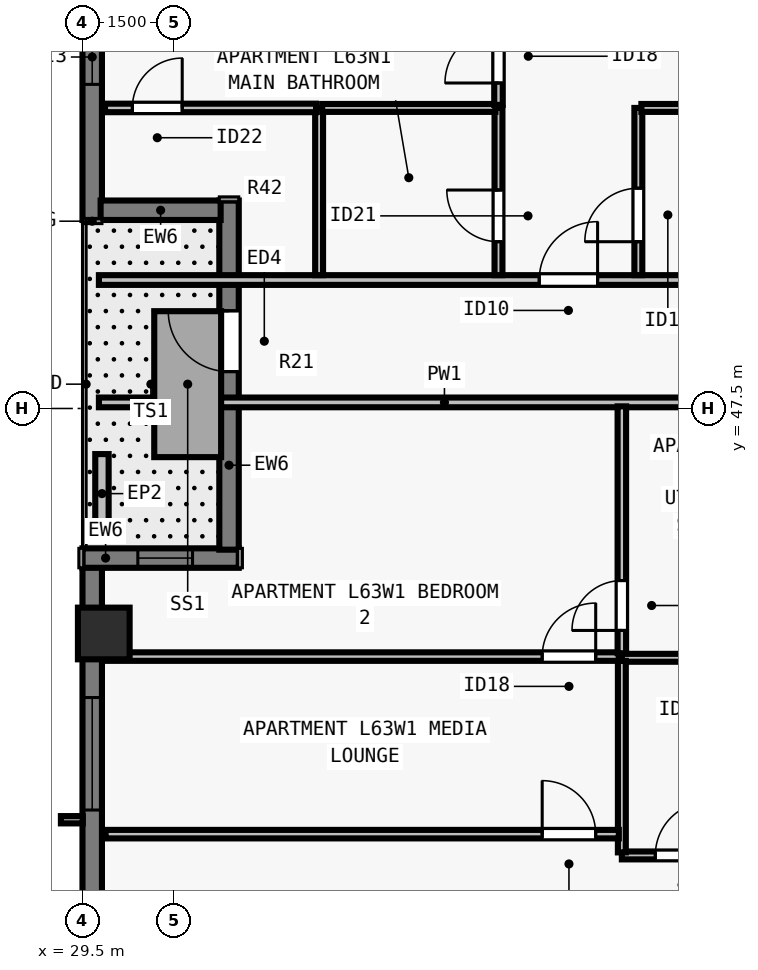
"""IFC4 building model, lengths in metres.
Left out: names, types, materials, properties, quantities, classifications, styles, units other than length and angle.
Written with IfcOpenShell. Run it as: python <this file> out.ifc"""

import sys

from ifc_helpers import new_model, si_unit, direction, frame, frame_2d, origin, origin_2d, place, context, subcontext, project, spatial, rectangle, extrude, element, fill, save


model = new_model("IFC4")
c1 = context("Model", 3, precision=1e-05, world=origin(), true_north=direction((0.0, 1.0)))
c2 = subcontext(c1, "Body", "Model", "MODEL_VIEW")
j1 = project(units=[si_unit("LENGTHUNIT", "METRE"), si_unit("PLANEANGLEUNIT", "RADIAN")], contexts=[c1])
p1 = place(None, origin())
s1 = spatial("IfcSite", under=j1, at=p1, CompositionType="ELEMENT")
p2 = place(p1, origin())
s2 = spatial("IfcBuilding", under=s1, at=p2, CompositionType="ELEMENT")
p3 = place(p2, frame((0.0, 0.0, 230.5)))
s3 = spatial("IfcBuildingStorey", under=s2, at=p3, CompositionType="ELEMENT", Elevation=230.5)
p4 = place(p3, frame((29.85, 43.8, 0.0), z_axis=(0.0, 0.0, 1.0), x_axis=(0.0, 1.0, 0.0)))
e1 = element("IfcColumn", 1, at=p4, inside=s3, PredefinedType="COLUMN", context=c2, shape_type="SweptSolid", body=[
    extrude(rectangle(XDim=0.85, YDim=0.85, at=origin_2d()), origin(), (0.0, 0.0, 1.0), 3.5),
])
p5 = place(p3, frame((29.66, 50.6, 0.0), z_axis=(0.0, 0.0, 1.0), x_axis=(0.0, 1.0, 0.0)))
e2 = element("IfcWall", 2, at=p5, inside=s3, PredefinedType="SOLIDWALL", context=c2, shape_type="SweptSolid", body=[
    extrude(rectangle(XDim=5.602, YDim=0.32, at=frame_2d((2.801, 0.0))), origin(), (0.0, 0.0, 1.0), 3.29),
])
p6 = place(p5, frame((2.23, 0.0, 0.8)))
e3 = element("IfcOpeningElement", 3, at=p6, cuts=e2, PredefinedType="OPENING", context=c2, shape_type="SweptSolid", body=[
    extrude(rectangle(XDim=0.9, YDim=1.678, at=frame_2d((0.45, 0.839))), frame((0.0, 0.17, 0.0), z_axis=(0.0, -1.0, 0.0), x_axis=(1.0, 0.0, 0.0)), (0.0, 0.0, 1.0), 0.34),
])
p7 = place(p3, frame((29.66, 21.5, 0.0), z_axis=(0.0, 0.0, 1.0), x_axis=(0.0, 1.0, 0.0)))
e4 = element("IfcWall", 4, at=p7, inside=s3, PredefinedType="SOLIDWALL", context=c2, shape_type="SweptSolid", body=[
    extrude(rectangle(XDim=23.402, YDim=0.32, at=frame_2d((11.701, 0.0))), origin(), (0.0, 0.0, 1.0), 3.29),
])
p8 = place(p7, frame((9.416, 0.0, 0.8)))
e5 = element("IfcOpeningElement", 5, at=p8, cuts=e4, PredefinedType="OPENING", context=c2, shape_type="SweptSolid", body=[
    extrude(rectangle(XDim=1.55, YDim=1.678, at=frame_2d((0.775, 0.839))), frame((0.0, 0.17, 0.0), z_axis=(0.0, -1.0, 0.0), x_axis=(1.0, 0.0, 0.0)), (0.0, 0.0, 1.0), 0.34),
])
p9 = place(p7, frame((15.886, 0.0, 0.8)))
e6 = element("IfcOpeningElement", 6, at=p9, cuts=e4, PredefinedType="OPENING", context=c2, shape_type="SweptSolid", body=[
    extrude(rectangle(XDim=1.55, YDim=1.678, at=frame_2d((0.775, 0.839))), frame((0.0, 0.17, 0.0), z_axis=(0.0, -1.0, 0.0), x_axis=(1.0, 0.0, 0.0)), (0.0, 0.0, 1.0), 0.34),
])
p10 = place(p7, frame((19.397, 0.0, 0.8)))
e7 = element("IfcOpeningElement", 7, at=p10, cuts=e4, PredefinedType="OPENING", context=c2, shape_type="SweptSolid", body=[
    extrude(rectangle(XDim=1.85, YDim=1.678, at=frame_2d((0.925, 0.839))), frame((0.0, 0.17, 0.0), z_axis=(0.0, -1.0, 0.0), x_axis=(1.0, 0.0, 0.0)), (0.0, 0.0, 1.0), 0.34),
])
p11 = place(p3, frame((29.5, 45.04, 0.0), z_axis=(0.0, 0.0, 1.0), x_axis=(1.0, 0.0, 0.0)))
e8 = element("IfcWall", 8, at=p11, inside=s3, PredefinedType="SOLIDWALL", context=c2, shape_type="SweptSolid", body=[
    extrude(rectangle(XDim=2.57, YDim=0.32, at=frame_2d((1.285, 0.0))), origin(), (0.0, 0.0, 1.0), 3.29),
])
p12 = place(p11, frame((0.91, 0.0, 0.8)))
e9 = element("IfcOpeningElement", 9, at=p12, cuts=e8, PredefinedType="OPENING", context=c2, shape_type="SweptSolid", body=[
    extrude(rectangle(XDim=0.9, YDim=1.678, at=frame_2d((0.45, 0.839))), frame((0.0, 0.17, 0.0), z_axis=(0.0, -1.0, 0.0), x_axis=(1.0, 0.0, 0.0)), (0.0, 0.0, 1.0), 0.34),
])
p13 = place(p3, frame((31.91, 45.178, 0.0), z_axis=(0.0, 0.0, 1.0), x_axis=(0.0, 1.0, 0.0)))
e10 = element("IfcWall", 10, at=p13, inside=s3, PredefinedType="SOLIDWALL", context=c2, shape_type="SweptSolid", body=[
    extrude(rectangle(XDim=5.742, YDim=0.32, at=frame_2d((2.871, 0.0))), origin(), (0.0, 0.0, 1.0), 3.29),
])
p14 = place(p13, frame((2.928, 0.0, 0.0)))
e11 = element("IfcOpeningElement", 11, at=p14, cuts=e10, PredefinedType="OPENING", context=c2, shape_type="SweptSolid", body=[
    extrude(rectangle(XDim=1.0, YDim=2.15, at=frame_2d((0.5, 1.075))), frame((0.0, 0.17, 0.0), z_axis=(0.0, -1.0, 0.0), x_axis=(1.0, 0.0, 0.0)), (0.0, 0.0, 1.0), 0.34),
])
p15 = place(p3, frame((31.772, 50.76, 0.0), z_axis=(0.0, 0.0, 1.0), x_axis=(-1.0, 0.0, 0.0)))
e12 = element("IfcWall", 12, at=p15, inside=s3, PredefinedType="SOLIDWALL", context=c2, shape_type="SweptSolid", body=[
    extrude(rectangle(XDim=1.974, YDim=0.32, at=frame_2d((0.987, 0.0))), origin(), (0.0, 0.0, 1.0), 3.29),
])
p16 = place(p3, frame((29.82, 45.45, 0.0), z_axis=(0.0, 0.0, 1.0), x_axis=(0.0, 1.0, 0.0)))
e13 = element("IfcWall", 13, at=p16, inside=s3, PredefinedType="PARAPET", context=c2, shape_type="SweptSolid", body=[
    extrude(rectangle(XDim=1.3, YDim=0.22, at=frame_2d((0.65, 0.0))), origin(), (0.0, 0.0, 1.0), 0.55),
])
p17 = place(p3, frame((29.77, 49.613, 0.0), z_axis=(0.0, 0.0, 1.0), x_axis=(1.0, 0.0, 0.0)))
e14 = element("IfcWall", 14, at=p17, inside=s3, PredefinedType="PARTITIONING", context=c2, shape_type="SweptSolid", body=[
    extrude(rectangle(XDim=44.425, YDim=0.16, at=frame_2d((22.212, 0.0))), origin(), (0.0, 0.0, 1.0), 2.958),
])
p18 = place(p17, frame((7.241, 0.0, 0.0)))
e15 = element("IfcOpeningElement", 15, at=p18, cuts=e14, PredefinedType="OPENING", context=c2, shape_type="SweptSolid", body=[
    extrude(rectangle(XDim=0.96, YDim=2.18, at=frame_2d((0.48, 1.09))), frame((0.0, 0.09, 0.0), z_axis=(0.0, -1.0, 0.0), x_axis=(1.0, 0.0, 0.0)), (0.0, 0.0, 1.0), 0.18),
])
p19 = place(p17, frame((21.815, 0.0, 0.0)))
e16 = element("IfcOpeningElement", 16, at=p19, cuts=e14, PredefinedType="OPENING", context=c2, shape_type="SweptSolid", body=[
    extrude(rectangle(XDim=0.96, YDim=2.18, at=frame_2d((0.48, 1.09))), frame((0.0, 0.09, 0.0), z_axis=(0.0, -1.0, 0.0), x_axis=(1.0, 0.0, 0.0)), (0.0, 0.0, 1.0), 0.18),
])
p20 = place(p17, frame((36.324, 0.0, 0.0)))
e17 = element("IfcOpeningElement", 17, at=p20, cuts=e14, PredefinedType="OPENING", context=c2, shape_type="SweptSolid", body=[
    extrude(rectangle(XDim=0.96, YDim=2.18, at=frame_2d((0.48, 1.09))), frame((0.0, 0.09, 0.0), z_axis=(0.0, -1.0, 0.0), x_axis=(1.0, 0.0, 0.0)), (0.0, 0.0, 1.0), 0.18),
])
p21 = place(p3, frame((29.77, 47.6, 0.0), z_axis=(0.0, 0.0, 1.0), x_axis=(1.0, 0.0, 0.0)))
e18 = element("IfcWall", 18, at=p21, inside=s3, PredefinedType="PARTITIONING", context=c2, shape_type="SweptSolid", body=[
    extrude(rectangle(XDim=11.365, YDim=0.16, at=frame_2d((5.683, 0.0))), origin(), (0.0, 0.0, 1.0), 3.29),
])
p22 = place(p3, frame((33.391, 49.692, 0.0), z_axis=(0.0, 0.0, 1.0), x_axis=(0.0, 1.0, 0.0)))
e19 = element("IfcWall", 19, at=p22, inside=s3, PredefinedType="PLUMBINGWALL", context=c2, shape_type="SweptSolid", body=[
    extrude(rectangle(XDim=2.75, YDim=0.13, at=frame_2d((1.375, 0.0))), origin(), (0.0, 0.0, 1.0), 3.29),
])
p23 = place(p3, frame((36.341, 49.692, 0.0), z_axis=(0.0, 0.0, 1.0), x_axis=(0.0, 1.0, 0.0)))
e20 = element("IfcWall", 20, at=p23, inside=s3, PredefinedType="PLUMBINGWALL", context=c2, shape_type="SweptSolid", body=[
    extrude(rectangle(XDim=2.75, YDim=0.13, at=frame_2d((1.375, 0.0))), origin(), (0.0, 0.0, 1.0), 3.29),
])
p24 = place(p23, frame((0.55, 0.0, 0.0)))
e21 = element("IfcOpeningElement", 21, at=p24, cuts=e20, PredefinedType="OPENING", context=c2, shape_type="SweptSolid", body=[
    extrude(rectangle(XDim=0.85, YDim=2.08, at=frame_2d((0.425, 1.04))), frame((0.0, 0.075, 0.0), z_axis=(0.0, -1.0, 0.0), x_axis=(1.0, 0.0, 0.0)), (0.0, 0.0, 1.0), 0.15),
])
p25 = place(p3, frame((33.441, 52.442, 0.0), z_axis=(0.0, 0.0, 1.0), x_axis=(1.0, 0.0, 0.0)))
e22 = element("IfcWall", 22, at=p25, inside=s3, PredefinedType="PLUMBINGWALL", context=c2, shape_type="SweptSolid", body=[
    extrude(rectangle(XDim=2.85, YDim=0.13, at=frame_2d((1.425, 0.0))), origin(), (0.0, 0.0, 1.0), 2.958),
])
p26 = place(p3, frame((38.641, 49.692, 0.0), z_axis=(0.0, 0.0, 1.0), x_axis=(0.0, 1.0, 0.0)))
e23 = element("IfcWall", 23, at=p26, inside=s3, PredefinedType="PLUMBINGWALL", context=c2, shape_type="SweptSolid", body=[
    extrude(rectangle(XDim=2.75, YDim=0.13, at=frame_2d((1.375, 0.0))), origin(), (0.0, 0.0, 1.0), 3.29),
])
p27 = place(p26, frame((0.55, 0.0, 0.0)))
e24 = element("IfcOpeningElement", 24, at=p27, cuts=e23, PredefinedType="OPENING", context=c2, shape_type="SweptSolid", body=[
    extrude(rectangle(XDim=0.88, YDim=2.1, at=frame_2d((0.44, 1.05))), frame((0.0, 0.075, 0.0), z_axis=(0.0, -1.0, 0.0), x_axis=(1.0, 0.0, 0.0)), (0.0, 0.0, 1.0), 0.15),
])
p28 = place(p3, frame((38.691, 52.442, 0.0), z_axis=(0.0, 0.0, 1.0), x_axis=(1.0, 0.0, 0.0)))
e25 = element("IfcWall", 25, at=p28, inside=s3, PredefinedType="PLUMBINGWALL", context=c2, shape_type="SweptSolid", body=[
    extrude(rectangle(XDim=3.15, YDim=0.13, at=frame_2d((1.575, 0.0))), origin(), (0.0, 0.0, 1.0), 3.29),
])
p29 = place(p3, frame((36.341, 52.492, 0.0), z_axis=(0.0, 0.0, 1.0), x_axis=(0.0, 1.0, 0.0)))
e26 = element("IfcWall", 26, at=p29, inside=s3, PredefinedType="PARTITIONING", context=c2, shape_type="SweptSolid", body=[
    extrude(rectangle(XDim=8.628, YDim=0.14, at=frame_2d((4.314, 0.0))), origin(), (0.0, 0.0, 1.0), 2.573),
])
p30 = place(p29, frame((0.36, 0.0, 0.0)))
e27 = element("IfcOpeningElement", 27, at=p30, cuts=e26, PredefinedType="OPENING", context=c2, shape_type="SweptSolid", body=[
    extrude(rectangle(XDim=0.88, YDim=2.1, at=frame_2d((0.44, 1.05))), frame((0.0, 0.08, 0.0), z_axis=(0.0, -1.0, 0.0), x_axis=(1.0, 0.0, 0.0)), (0.0, 0.0, 1.0), 0.16),
])
p31 = place(p3, frame((29.87, 52.442, 0.0), z_axis=(0.0, 0.0, 1.0), x_axis=(1.0, 0.0, 0.0)))
e28 = element("IfcWall", 28, at=p31, inside=s3, PredefinedType="PARTITIONING", context=c2, shape_type="SweptSolid", body=[
    extrude(rectangle(XDim=3.471, YDim=0.14, at=frame_2d((1.736, 0.0))), origin(), (0.0, 0.0, 1.0), 3.29),
])
p32 = place(p31, frame((0.45, 0.0, 0.0)))
e29 = element("IfcOpeningElement", 29, at=p32, cuts=e28, PredefinedType="OPENING", context=c2, shape_type="SweptSolid", body=[
    extrude(rectangle(XDim=0.82, YDim=2.1, at=frame_2d((0.41, 1.05))), frame((0.0, 0.08, 0.0), z_axis=(0.0, -1.0, 0.0), x_axis=(1.0, 0.0, 0.0)), (0.0, 0.0, 1.0), 0.16),
])
p33 = place(p3, frame((38.37, 43.4, 0.0), z_axis=(0.0, 0.0, 1.0), x_axis=(1.0, 0.0, 0.0)))
e30 = element("IfcWall", 30, at=p33, inside=s3, PredefinedType="PLUMBINGWALL", context=c2, shape_type="SweptSolid", body=[
    extrude(rectangle(XDim=2.75, YDim=0.13, at=frame_2d((1.375, 0.0))), origin(), (0.0, 0.0, 1.0), 2.958),
])
p34 = place(p3, frame((38.37, 40.15, 0.0), z_axis=(0.0, 0.0, 1.0), x_axis=(1.0, 0.0, 0.0)))
e31 = element("IfcWall", 31, at=p34, inside=s3, PredefinedType="PLUMBINGWALL", context=c2, shape_type="SweptSolid", body=[
    extrude(rectangle(XDim=2.75, YDim=0.13, at=frame_2d((1.375, 0.0))), origin(), (0.0, 0.0, 1.0), 3.29),
])
p35 = place(p34, frame((0.55, 0.0, 0.0)))
e32 = element("IfcOpeningElement", 32, at=p35, cuts=e31, PredefinedType="OPENING", context=c2, shape_type="SweptSolid", body=[
    extrude(rectangle(XDim=0.88, YDim=2.1, at=frame_2d((0.44, 1.05))), frame((0.0, 0.075, 0.0), z_axis=(0.0, -1.0, 0.0), x_axis=(1.0, 0.0, 0.0)), (0.0, 0.0, 1.0), 0.15),
])
p36 = place(p3, frame((38.37, 40.2, 0.0), z_axis=(0.0, 0.0, 1.0), x_axis=(0.0, 1.0, 0.0)))
e33 = element("IfcWall", 33, at=p36, inside=s3, PredefinedType="PLUMBINGWALL", context=c2, shape_type="SweptSolid", body=[
    extrude(rectangle(XDim=3.15, YDim=0.13, at=frame_2d((1.575, 0.0))), origin(), (0.0, 0.0, 1.0), 3.29),
])
p37 = place(p3, frame((29.88, 43.42, 0.0), z_axis=(0.0, 0.0, 1.0), x_axis=(1.0, 0.0, 0.0)))
e34 = element("IfcWall", 34, at=p37, inside=s3, PredefinedType="PARTITIONING", context=c2, shape_type="SweptSolid", body=[
    extrude(rectangle(XDim=8.44, YDim=0.14, at=frame_2d((4.22, 0.0))), origin(), (0.0, 0.0, 1.0), 3.29),
])
p38 = place(p37, frame((7.18, 0.0, 0.0)))
e35 = element("IfcOpeningElement", 35, at=p38, cuts=e34, PredefinedType="OPENING", context=c2, shape_type="SweptSolid", body=[
    extrude(rectangle(XDim=0.88, YDim=2.1, at=frame_2d((0.44, 1.05))), frame((0.0, 0.08, 0.0), z_axis=(0.0, -1.0, 0.0), x_axis=(1.0, 0.0, 0.0)), (0.0, 0.0, 1.0), 0.16),
])
p39 = place(p3, frame((38.37, 43.475, 0.0), z_axis=(0.0, 0.0, 1.0), x_axis=(0.0, 1.0, 0.0)))
e36 = element("IfcWall", 36, at=p39, inside=s3, PredefinedType="PARTITIONING", context=c2, shape_type="SweptSolid", body=[
    extrude(rectangle(XDim=4.06, YDim=0.14, at=frame_2d((2.03, 0.0))), origin(), (0.0, 0.0, 1.0), 3.29),
])
p40 = place(p39, frame((0.375, 0.0, 0.0)))
e37 = element("IfcOpeningElement", 37, at=p40, cuts=e36, PredefinedType="OPENING", context=c2, shape_type="SweptSolid", body=[
    extrude(rectangle(XDim=0.82, YDim=2.1, at=frame_2d((0.41, 1.05))), frame((0.0, 0.08, 0.0), z_axis=(0.0, -1.0, 0.0), x_axis=(1.0, 0.0, 0.0)), (0.0, 0.0, 1.0), 0.16),
])
p41 = place(p3, frame((29.88, 40.5, 0.0), z_axis=(0.0, 0.0, 1.0), x_axis=(1.0, 0.0, 0.0)))
e38 = element("IfcWall", 38, at=p41, inside=s3, PredefinedType="PARTITIONING", context=c2, shape_type="SweptSolid", body=[
    extrude(rectangle(XDim=8.44, YDim=0.14, at=frame_2d((4.22, 0.0))), origin(), (0.0, 0.0, 1.0), 2.958),
])
p42 = place(p41, frame((7.18, 0.0, 0.0)))
e39 = element("IfcOpeningElement", 39, at=p42, cuts=e38, PredefinedType="OPENING", context=c2, shape_type="SweptSolid", body=[
    extrude(rectangle(XDim=0.88, YDim=2.1, at=frame_2d((0.44, 1.05))), frame((0.0, 0.08, 0.0), z_axis=(0.0, -1.0, 0.0), x_axis=(1.0, 0.0, 0.0)), (0.0, 0.0, 1.0), 0.16),
])
p43 = place(p10, origin())
e40 = element("IfcWindow", 40, at=p43, inside=s3, PartitioningType="SINGLE_PANEL", PredefinedType="WINDOW", context=c2, shape_type="SweptSolid", body=[
    extrude(rectangle(XDim=1.85, YDim=1.678, at=frame_2d((0.925, 0.839))), frame((0.0, -0.05, 0.0), z_axis=(0.0, -1.0, 0.0), x_axis=(1.0, 0.0, 0.0)), (0.0, 0.0, 1.0), 0.06),
])
fill(e7, e40)
p44 = place(p14, origin())
e41 = element("IfcDoor", 41, at=p44, inside=s3, OperationType="SINGLE_SWING_RIGHT", PredefinedType="DOOR", context=c2, shape_type="SweptSolid", body=[
    extrude(rectangle(XDim=1.0, YDim=2.15, at=frame_2d((0.5, 1.075))), frame((0.0, 0.025, 0.0), z_axis=(0.0, -1.0, 0.0), x_axis=(1.0, 0.0, 0.0)), (0.0, 0.0, 1.0), 0.05),
])
fill(e11, e41)
p45 = place(p6, origin())
e42 = element("IfcWindow", 42, at=p45, inside=s3, PartitioningType="SINGLE_PANEL", PredefinedType="WINDOW", context=c2, shape_type="SweptSolid", body=[
    extrude(rectangle(XDim=0.9, YDim=1.678, at=frame_2d((0.45, 0.839))), frame((0.0, -0.04, 0.0), z_axis=(0.0, -1.0, 0.0), x_axis=(1.0, 0.0, 0.0)), (0.0, 0.0, 1.0), 0.06),
])
fill(e3, e42)
p46 = place(p12, origin())
e43 = element("IfcWindow", 43, at=p46, inside=s3, PartitioningType="SINGLE_PANEL", PredefinedType="WINDOW", context=c2, shape_type="SweptSolid", body=[
    extrude(rectangle(XDim=0.9, YDim=1.678, at=frame_2d((0.45, 0.839))), frame((0.0, -0.04, 0.0), z_axis=(0.0, -1.0, 0.0), x_axis=(1.0, 0.0, 0.0)), (0.0, 0.0, 1.0), 0.06),
])
fill(e9, e43)
p47 = place(p24, origin())
e44 = element("IfcDoor", 44, at=p47, inside=s3, OperationType="SINGLE_SWING_RIGHT", PredefinedType="DOOR", context=c2, shape_type="SweptSolid", body=[
    extrude(rectangle(XDim=0.85, YDim=2.08, at=frame_2d((0.425, 1.04))), frame((0.0, 0.025, 0.0), z_axis=(0.0, -1.0, 0.0), x_axis=(1.0, 0.0, 0.0)), (0.0, 0.0, 1.0), 0.05),
])
fill(e21, e44)
p48 = place(p27, origin())
e45 = element("IfcDoor", 45, at=p48, inside=s3, OperationType="SINGLE_SWING_LEFT", PredefinedType="DOOR", context=c2, shape_type="SweptSolid", body=[
    extrude(rectangle(XDim=0.88, YDim=2.1, at=frame_2d((0.44, 1.05))), frame((0.0, 0.025, 0.0), z_axis=(0.0, -1.0, 0.0), x_axis=(1.0, 0.0, 0.0)), (0.0, 0.0, 1.0), 0.05),
])
fill(e24, e45)
p49 = place(p32, origin())
e46 = element("IfcDoor", 46, at=p49, inside=s3, OperationType="SINGLE_SWING_RIGHT", PredefinedType="DOOR", context=c2, shape_type="SweptSolid", body=[
    extrude(rectangle(XDim=0.82, YDim=2.1, at=frame_2d((0.41, 1.05))), frame((0.0, 0.025, 0.0), z_axis=(0.0, -1.0, 0.0), x_axis=(1.0, 0.0, 0.0)), (0.0, 0.0, 1.0), 0.05),
])
fill(e29, e46)
p50 = place(p30, origin())
e47 = element("IfcDoor", 47, at=p50, inside=s3, OperationType="SINGLE_SWING_LEFT", PredefinedType="DOOR", context=c2, shape_type="SweptSolid", body=[
    extrude(rectangle(XDim=0.88, YDim=2.1, at=frame_2d((0.44, 1.05))), frame((0.0, 0.025, 0.0), z_axis=(0.0, -1.0, 0.0), x_axis=(1.0, 0.0, 0.0)), (0.0, 0.0, 1.0), 0.05),
])
fill(e27, e47)
p51 = place(p18, origin())
e48 = element("IfcDoor", 48, at=p51, inside=s3, OperationType="SINGLE_SWING_RIGHT", PredefinedType="DOOR", context=c2, shape_type="SweptSolid", body=[
    extrude(rectangle(XDim=0.96, YDim=2.18, at=frame_2d((0.48, 1.09))), frame((0.0, 0.025, 0.0), z_axis=(0.0, -1.0, 0.0), x_axis=(1.0, 0.0, 0.0)), (0.0, 0.0, 1.0), 0.05),
])
fill(e15, e48)
p52 = place(p35, origin())
e49 = element("IfcDoor", 49, at=p52, inside=s3, OperationType="SINGLE_SWING_RIGHT", PredefinedType="DOOR", context=c2, shape_type="SweptSolid", body=[
    extrude(rectangle(XDim=0.88, YDim=2.1, at=frame_2d((0.44, 1.05))), frame((0.0, 0.025, 0.0), z_axis=(0.0, -1.0, 0.0), x_axis=(1.0, 0.0, 0.0)), (0.0, 0.0, 1.0), 0.05),
])
fill(e32, e49)
p53 = place(p40, origin())
e50 = element("IfcDoor", 50, at=p53, inside=s3, OperationType="SINGLE_SWING_LEFT", PredefinedType="DOOR", context=c2, shape_type="SweptSolid", body=[
    extrude(rectangle(XDim=0.82, YDim=2.1, at=frame_2d((0.41, 1.05))), frame((0.0, 0.025, 0.0), z_axis=(0.0, -1.0, 0.0), x_axis=(1.0, 0.0, 0.0)), (0.0, 0.0, 1.0), 0.05),
])
fill(e37, e50)
p54 = place(p38, origin())
e51 = element("IfcDoor", 51, at=p54, inside=s3, OperationType="SINGLE_SWING_RIGHT", PredefinedType="DOOR", context=c2, shape_type="SweptSolid", body=[
    extrude(rectangle(XDim=0.88, YDim=2.1, at=frame_2d((0.44, 1.05))), frame((0.0, 0.025, 0.0), z_axis=(0.0, -1.0, 0.0), x_axis=(1.0, 0.0, 0.0)), (0.0, 0.0, 1.0), 0.05),
])
fill(e35, e51)
p55 = place(p42, origin())
e52 = element("IfcDoor", 52, at=p55, inside=s3, OperationType="SINGLE_SWING_LEFT", PredefinedType="DOOR", context=c2, shape_type="SweptSolid", body=[
    extrude(rectangle(XDim=0.88, YDim=2.1, at=frame_2d((0.44, 1.05))), frame((0.0, 0.025, 0.0), z_axis=(0.0, -1.0, 0.0), x_axis=(1.0, 0.0, 0.0)), (0.0, 0.0, 1.0), 0.05),
])
fill(e39, e52)
save(model, sys.argv[1])
